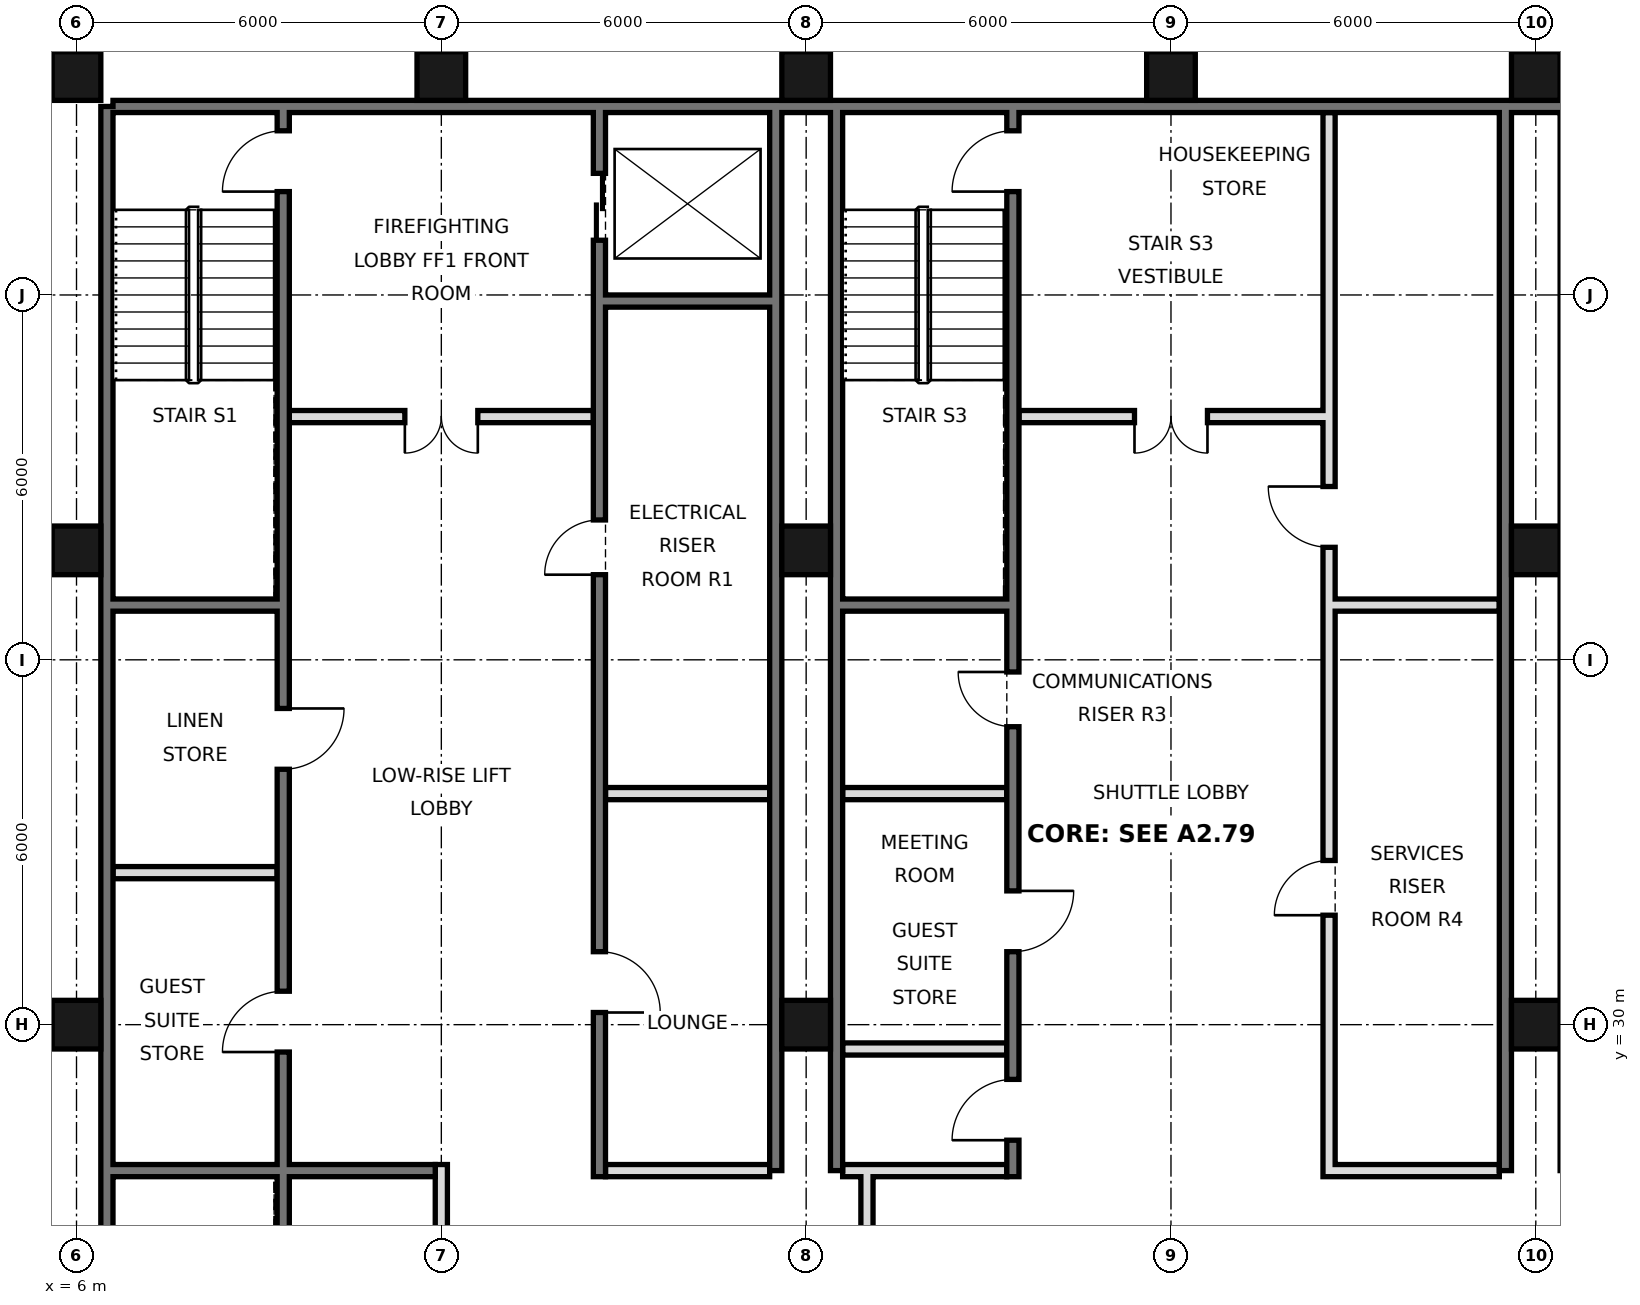
"""IFC4 building model, lengths in metres.
Left out: names, types, materials, properties, quantities, classifications, styles, units other than length and angle.
Written with IfcOpenShell. Run it as: python <this file> out.ifc"""

import sys

from ifc_helpers import new_model, si_unit, direction, frame, frame_2d, origin, origin_2d, place, context, subcontext, project, spatial, rectangle, hollow_rectangle, extrude, element, fill, save


model = new_model("IFC4")
c1 = context("Model", 3, precision=1e-05, world=origin(), true_north=direction((0.0, 1.0)))
c2 = subcontext(c1, "Body", "Model", "MODEL_VIEW")
j1 = project(units=[si_unit("LENGTHUNIT", "METRE"), si_unit("PLANEANGLEUNIT", "RADIAN")], contexts=[c1])
p1 = place(None, origin())
s1 = spatial("IfcSite", under=j1, at=p1, CompositionType="ELEMENT")
p2 = place(p1, origin())
s2 = spatial("IfcBuilding", under=s1, at=p2, CompositionType="ELEMENT")
p3 = place(p2, frame((0.0, 0.0, 316.0)))
s3 = spatial("IfcBuildingStorey", under=s2, at=p3, CompositionType="ELEMENT", Elevation=316.0)
for number, where, z_axis, x_axis in (
    (1, (6.0, 30.0, 0.0), (0.0, 0.0, 1.0), (1.0, 0.0, 0.0)),
    (2, (6.0, 37.8, 0.0), (0.0, 0.0, 1.0), (1.0, 0.0, 0.0)),
    (3, (6.0, 45.6, 0.0), (0.0, 0.0, 1.0), (1.0, 0.0, 0.0)),
    (4, (12.0, 45.6, 0.0), (0.0, 0.0, 1.0), (1.0, 0.0, 0.0)),
    (5, (18.0, 30.0, 0.0), (0.0, 0.0, 1.0), (1.0, 0.0, 0.0)),
    (6, (18.0, 37.8, 0.0), (0.0, 0.0, 1.0), (1.0, 0.0, 0.0)),
    (7, (18.0, 45.6, 0.0), (0.0, 0.0, 1.0), (1.0, 0.0, 0.0)),
    (8, (24.0, 45.6, 0.0), (0.0, 0.0, 1.0), (1.0, 0.0, 0.0)),
    (9, (30.0, 30.0, 0.0), (0.0, 0.0, 1.0), (1.0, 0.0, 0.0)),
    (10, (30.0, 37.8, 0.0), (0.0, 0.0, 1.0), (1.0, 0.0, 0.0)),
    (11, (30.0, 45.6, 0.0), (0.0, 0.0, 1.0), (1.0, 0.0, 0.0)),
):
    element("IfcColumn", number, at=place(p3, frame(where, z_axis=z_axis, x_axis=x_axis)), inside=s3, PredefinedType="COLUMN", context=c2, shape_type="SweptSolid", body=[
        extrude(hollow_rectangle(XDim=0.8, YDim=0.8, WallThickness=0.025, at=origin_2d()), origin(), (0.0, 0.0, 1.0), 3.6),
    ])
p4 = place(p3, frame((6.5, 21.6, 0.0), z_axis=(0.0, 0.0, 1.0), x_axis=(0.0, 1.0, 0.0)))
e12 = element("IfcWall", 12, at=p4, inside=s3, PredefinedType="SOLIDWALL", context=c2, shape_type="SweptSolid", body=[
    extrude(rectangle(XDim=23.5, YDim=0.2, at=frame_2d((11.75, 0.0))), origin(), (0.0, 0.0, 1.0), 3.42),
])
p5 = place(p3, frame((6.6, 45.1, 0.0), z_axis=(0.0, 0.0, 1.0), x_axis=(1.0, 0.0, 0.0)))
e13 = element("IfcWall", 13, at=p5, inside=s3, PredefinedType="SOLIDWALL", context=c2, shape_type="SweptSolid", body=[
    extrude(rectangle(XDim=34.8, YDim=0.2, at=frame_2d((17.4, 0.0))), origin(), (0.0, 0.0, 1.0), 3.42),
])
for number, where, z_axis, x_axis in (
    (14, (17.5, 27.6, 0.0), (0.0, 0.0, 1.0), (0.0, 1.0, 0.0)),
    (15, (18.5, 27.6, 0.0), (0.0, 0.0, 1.0), (0.0, 1.0, 0.0)),
    (16, (29.5, 27.6, 0.0), (0.0, 0.0, 1.0), (0.0, 1.0, 0.0)),
):
    element("IfcWall", number, at=place(p3, frame(where, z_axis=z_axis, x_axis=x_axis)), inside=s3, PredefinedType="SOLIDWALL", context=c2, shape_type="SweptSolid", body=[
        extrude(rectangle(XDim=17.5, YDim=0.2, at=frame_2d((8.75, 0.0))), origin(), (0.0, 0.0, 1.0), 3.42),
    ])
p6 = place(p3, frame((19.0, 21.6, 0.0), z_axis=(0.0, 0.0, 1.0), x_axis=(0.0, 1.0, 0.0)))
e17 = element("IfcWall", 17, at=p6, inside=s3, PredefinedType="PARTITIONING", context=c2, shape_type="SweptSolid", body=[
    extrude(rectangle(XDim=6.0, YDim=0.2, at=frame_2d((3.0, 0.0))), origin(), (0.0, 0.0, 1.0), 3.42),
])
p7 = place(p6, frame((2.1, 0.0, 0.0)))
e18 = element("IfcOpeningElement", 18, at=p7, cuts=e17, PredefinedType="OPENING", context=c2, shape_type="SweptSolid", body=[
    extrude(rectangle(XDim=1.8, YDim=2.1, at=frame_2d((0.9, 1.05))), frame((0.0, 0.11, 0.0), z_axis=(0.0, -1.0, 0.0), x_axis=(1.0, 0.0, 0.0)), (0.0, 0.0, 1.0), 0.22),
])
p8 = place(p3, frame((12.0, 21.6, 0.0), z_axis=(0.0, 0.0, 1.0), x_axis=(0.0, 1.0, 0.0)))
e19 = element("IfcWall", 19, at=p8, inside=s3, PredefinedType="PARTITIONING", context=c2, shape_type="SweptSolid", body=[
    extrude(rectangle(XDim=6.1, YDim=0.2, at=frame_2d((3.05, 0.0))), origin(), (0.0, 0.0, 1.0), 3.42),
])
p9 = place(p3, frame((14.6, 27.5, 0.0), z_axis=(0.0, 0.0, 1.0), x_axis=(0.0, 1.0, 0.0)))
e20 = element("IfcWall", 20, at=p9, inside=s3, PredefinedType="SOLIDWALL", context=c2, shape_type="SweptSolid", body=[
    extrude(rectangle(XDim=17.5, YDim=0.2, at=frame_2d((8.75, 0.0))), origin(), (0.0, 0.0, 1.0), 3.42),
])
p10 = place(p9, frame((15.4, 0.0, 0.0)))
e21 = element("IfcOpeningElement", 21, at=p10, cuts=e20, PredefinedType="OPENING", context=c2, shape_type="SweptSolid", body=[
    extrude(rectangle(XDim=1.1, YDim=2.1, at=frame_2d((0.55, 1.05))), frame((0.0, 0.11, 0.0), z_axis=(0.0, -1.0, 0.0), x_axis=(1.0, 0.0, 0.0)), (0.0, 0.0, 1.0), 0.22),
])
p11 = place(p9, frame((2.7, 0.0, 0.0)))
e22 = element("IfcOpeningElement", 22, at=p11, cuts=e20, PredefinedType="OPENING", context=c2, shape_type="SweptSolid", body=[
    extrude(rectangle(XDim=1.0, YDim=2.1, at=frame_2d((0.5, 1.05))), frame((0.0, 0.11, 0.0), z_axis=(0.0, -1.0, 0.0), x_axis=(1.0, 0.0, 0.0)), (0.0, 0.0, 1.0), 0.22),
])
p12 = place(p9, frame((9.9, 0.0, 0.0)))
e23 = element("IfcOpeningElement", 23, at=p12, cuts=e20, PredefinedType="OPENING", context=c2, shape_type="SweptSolid", body=[
    extrude(rectangle(XDim=0.9, YDim=2.1, at=frame_2d((0.45, 1.05))), frame((0.0, 0.11, 0.0), z_axis=(0.0, -1.0, 0.0), x_axis=(1.0, 0.0, 0.0)), (0.0, 0.0, 1.0), 0.22),
])
p13 = place(p3, frame((21.4, 27.5, 0.0), z_axis=(0.0, 0.0, 1.0), x_axis=(0.0, 1.0, 0.0)))
e24 = element("IfcWall", 24, at=p13, inside=s3, PredefinedType="SOLIDWALL", context=c2, shape_type="SweptSolid", body=[
    extrude(rectangle(XDim=17.5, YDim=0.2, at=frame_2d((8.75, 0.0))), origin(), (0.0, 0.0, 1.0), 3.42),
])
p14 = place(p13, frame((0.6, 0.0, 0.0)))
e25 = element("IfcOpeningElement", 25, at=p14, cuts=e24, PredefinedType="OPENING", context=c2, shape_type="SweptSolid", body=[
    extrude(rectangle(XDim=1.0, YDim=2.1, at=frame_2d((0.5, 1.05))), frame((0.0, 0.11, 0.0), z_axis=(0.0, -1.0, 0.0), x_axis=(1.0, 0.0, 0.0)), (0.0, 0.0, 1.0), 0.22),
])
p15 = place(p13, frame((3.7, 0.0, 0.0)))
e26 = element("IfcOpeningElement", 26, at=p15, cuts=e24, PredefinedType="OPENING", context=c2, shape_type="SweptSolid", body=[
    extrude(rectangle(XDim=1.0, YDim=2.1, at=frame_2d((0.5, 1.05))), frame((0.0, 0.11, 0.0), z_axis=(0.0, -1.0, 0.0), x_axis=(1.0, 0.0, 0.0)), (0.0, 0.0, 1.0), 0.22),
])
p16 = place(p13, frame((16.2, 0.0, 0.0)))
e27 = element("IfcOpeningElement", 27, at=p16, cuts=e24, PredefinedType="OPENING", context=c2, shape_type="SweptSolid", body=[
    extrude(rectangle(XDim=1.0, YDim=2.1, at=frame_2d((0.5, 1.05))), frame((0.0, 0.11, 0.0), z_axis=(0.0, -1.0, 0.0), x_axis=(1.0, 0.0, 0.0)), (0.0, 0.0, 1.0), 0.22),
])
p17 = place(p13, frame((7.4, 0.0, 0.0)))
e28 = element("IfcOpeningElement", 28, at=p17, cuts=e24, PredefinedType="OPENING", context=c2, shape_type="SweptSolid", body=[
    extrude(rectangle(XDim=0.9, YDim=2.1, at=frame_2d((0.45, 1.05))), frame((0.0, 0.11, 0.0), z_axis=(0.0, -1.0, 0.0), x_axis=(1.0, 0.0, 0.0)), (0.0, 0.0, 1.0), 0.22),
])
p18 = place(p3, frame((26.6, 27.5, 0.0), z_axis=(0.0, 0.0, 1.0), x_axis=(0.0, 1.0, 0.0)))
e29 = element("IfcWall", 29, at=p18, inside=s3, PredefinedType="SOLIDWALL", context=c2, shape_type="SweptSolid", body=[
    extrude(rectangle(XDim=17.5, YDim=0.2, at=frame_2d((8.75, 0.0))), origin(), (0.0, 0.0, 1.0), 3.42),
])
p19 = place(p18, frame((4.3, 0.0, 0.0)))
e30 = element("IfcOpeningElement", 30, at=p19, cuts=e29, PredefinedType="OPENING", context=c2, shape_type="SweptSolid", body=[
    extrude(rectangle(XDim=0.9, YDim=2.1, at=frame_2d((0.45, 1.05))), frame((0.0, 0.11, 0.0), z_axis=(0.0, -1.0, 0.0), x_axis=(1.0, 0.0, 0.0)), (0.0, 0.0, 1.0), 0.22),
])
p20 = place(p18, frame((10.35, 0.0, 0.0)))
e31 = element("IfcOpeningElement", 31, at=p20, cuts=e29, PredefinedType="OPENING", context=c2, shape_type="SweptSolid", body=[
    extrude(rectangle(XDim=1.0, YDim=2.1, at=frame_2d((0.5, 1.05))), frame((0.0, 0.11, 0.0), z_axis=(0.0, -1.0, 0.0), x_axis=(1.0, 0.0, 0.0)), (0.0, 0.0, 1.0), 0.22),
])
p21 = place(p3, frame((9.4, 21.6, 0.0), z_axis=(0.0, 0.0, 1.0), x_axis=(0.0, 1.0, 0.0)))
e32 = element("IfcWall", 32, at=p21, inside=s3, PredefinedType="SOLIDWALL", context=c2, shape_type="SweptSolid", body=[
    extrude(rectangle(XDim=23.4, YDim=0.2, at=frame_2d((11.7, 0.0))), origin(), (0.0, 0.0, 1.0), 3.42),
])
p22 = place(p21, frame((7.95, 0.0, 0.0)))
e33 = element("IfcOpeningElement", 33, at=p22, cuts=e32, PredefinedType="OPENING", context=c2, shape_type="SweptSolid", body=[
    extrude(rectangle(XDim=1.0, YDim=2.1, at=frame_2d((0.5, 1.05))), frame((0.0, 0.11, 0.0), z_axis=(0.0, -1.0, 0.0), x_axis=(1.0, 0.0, 0.0)), (0.0, 0.0, 1.0), 0.22),
])
p23 = place(p21, frame((12.6, 0.0, 0.0)))
e34 = element("IfcOpeningElement", 34, at=p23, cuts=e32, PredefinedType="OPENING", context=c2, shape_type="SweptSolid", body=[
    extrude(rectangle(XDim=1.0, YDim=2.1, at=frame_2d((0.5, 1.05))), frame((0.0, 0.11, 0.0), z_axis=(0.0, -1.0, 0.0), x_axis=(1.0, 0.0, 0.0)), (0.0, 0.0, 1.0), 0.22),
])
p24 = place(p21, frame((22.1, 0.0, 0.0)))
e35 = element("IfcOpeningElement", 35, at=p24, cuts=e32, PredefinedType="OPENING", context=c2, shape_type="SweptSolid", body=[
    extrude(rectangle(XDim=1.0, YDim=2.1, at=frame_2d((0.5, 1.05))), frame((0.0, 0.11, 0.0), z_axis=(0.0, -1.0, 0.0), x_axis=(1.0, 0.0, 0.0)), (0.0, 0.0, 1.0), 0.22),
])
p25 = place(p21, frame((0.175, 0.0, 0.0)))
e36 = element("IfcOpeningElement", 36, at=p25, cuts=e32, PredefinedType="OPENING", context=c2, shape_type="SweptSolid", body=[
    extrude(rectangle(XDim=0.9, YDim=2.1, at=frame_2d((0.45, 1.05))), frame((0.0, 0.11, 0.0), z_axis=(0.0, -1.0, 0.0), x_axis=(1.0, 0.0, 0.0)), (0.0, 0.0, 1.0), 0.22),
])
for number, where, z_axis, x_axis in (
    (37, (14.7, 27.6, 0.0), (0.0, 0.0, 1.0), (1.0, 0.0, 0.0)),
    (38, (18.6, 27.6, 0.0), (0.0, 0.0, 1.0), (1.0, 0.0, 0.0)),
):
    element("IfcWall", number, at=place(p3, frame(where, z_axis=z_axis, x_axis=x_axis)), inside=s3, PredefinedType="PARTITIONING", context=c2, shape_type="SweptSolid", body=[
        extrude(rectangle(XDim=2.7, YDim=0.2, at=frame_2d((1.35, 0.0))), origin(), (0.0, 0.0, 1.0), 3.42),
    ])
p26 = place(p3, frame((26.7, 27.6, 0.0), z_axis=(0.0, 0.0, 1.0), x_axis=(1.0, 0.0, 0.0)))
e39 = element("IfcWall", 39, at=p26, inside=s3, PredefinedType="SOLIDWALL", context=c2, shape_type="SweptSolid", body=[
    extrude(rectangle(XDim=2.7, YDim=0.2, at=frame_2d((1.35, 0.0))), origin(), (0.0, 0.0, 1.0), 3.42),
])
p27 = place(p3, frame((6.6, 27.6, 0.0), z_axis=(0.0, 0.0, 1.0), x_axis=(1.0, 0.0, 0.0)))
e40 = element("IfcWall", 40, at=p27, inside=s3, PredefinedType="SOLIDWALL", context=c2, shape_type="SweptSolid", body=[
    extrude(rectangle(XDim=5.3, YDim=0.2, at=frame_2d((2.65, 0.0))), origin(), (0.0, 0.0, 1.0), 3.42),
])
for number, where, z_axis, x_axis in (
    (41, (18.6, 29.6, 0.0), (0.0, 0.0, 1.0), (1.0, 0.0, 0.0)),
    (42, (6.6, 32.5, 0.0), (0.0, 0.0, 1.0), (1.0, 0.0, 0.0)),
):
    element("IfcWall", number, at=place(p3, frame(where, z_axis=z_axis, x_axis=x_axis)), inside=s3, PredefinedType="PARTITIONING", context=c2, shape_type="SweptSolid", body=[
        extrude(rectangle(XDim=2.7, YDim=0.2, at=frame_2d((1.35, 0.0))), origin(), (0.0, 0.0, 1.0), 3.42),
    ])
for number, where, z_axis, x_axis in (
    (43, (14.7, 33.8, 0.0), (0.0, 0.0, 1.0), (1.0, 0.0, 0.0)),
    (44, (18.6, 33.8, 0.0), (0.0, 0.0, 1.0), (1.0, 0.0, 0.0)),
    (45, (18.6, 36.9, 0.0), (0.0, 0.0, 1.0), (1.0, 0.0, 0.0)),
    (46, (26.7, 36.9, 0.0), (0.0, 0.0, 1.0), (1.0, 0.0, 0.0)),
    (47, (6.6, 36.9, 0.0), (0.0, 0.0, 1.0), (1.0, 0.0, 0.0)),
):
    element("IfcWall", number, at=place(p3, frame(where, z_axis=z_axis, x_axis=x_axis)), inside=s3, PredefinedType="SOLIDWALL", context=c2, shape_type="SweptSolid", body=[
        extrude(rectangle(XDim=2.7, YDim=0.2, at=frame_2d((1.35, 0.0))), origin(), (0.0, 0.0, 1.0), 3.42),
    ])
p28 = place(p3, frame((21.5, 40.0, 0.0), z_axis=(0.0, 0.0, 1.0), x_axis=(1.0, 0.0, 0.0)))
e48 = element("IfcWall", 48, at=p28, inside=s3, PredefinedType="PARTITIONING", context=c2, shape_type="SweptSolid", body=[
    extrude(rectangle(XDim=5.0, YDim=0.2, at=frame_2d((2.5, 0.0))), origin(), (0.0, 0.0, 1.0), 3.42),
])
p29 = place(p28, frame((1.9, 0.0, 0.0)))
e49 = element("IfcOpeningElement", 49, at=p29, cuts=e48, PredefinedType="OPENING", context=c2, shape_type="SweptSolid", body=[
    extrude(rectangle(XDim=1.2, YDim=2.1, at=frame_2d((0.6, 1.05))), frame((0.0, 0.11, 0.0), z_axis=(0.0, -1.0, 0.0), x_axis=(1.0, 0.0, 0.0)), (0.0, 0.0, 1.0), 0.22),
])
p30 = place(p3, frame((9.5, 40.0, 0.0), z_axis=(0.0, 0.0, 1.0), x_axis=(1.0, 0.0, 0.0)))
e50 = element("IfcWall", 50, at=p30, inside=s3, PredefinedType="PARTITIONING", context=c2, shape_type="SweptSolid", body=[
    extrude(rectangle(XDim=5.0, YDim=0.2, at=frame_2d((2.5, 0.0))), origin(), (0.0, 0.0, 1.0), 3.42),
])
p31 = place(p30, frame((1.9, 0.0, 0.0)))
e51 = element("IfcOpeningElement", 51, at=p31, cuts=e50, PredefinedType="OPENING", context=c2, shape_type="SweptSolid", body=[
    extrude(rectangle(XDim=1.2, YDim=2.1, at=frame_2d((0.6, 1.05))), frame((0.0, 0.11, 0.0), z_axis=(0.0, -1.0, 0.0), x_axis=(1.0, 0.0, 0.0)), (0.0, 0.0, 1.0), 0.22),
])
p32 = place(p3, frame((14.7, 41.9, 0.0), z_axis=(0.0, 0.0, 1.0), x_axis=(1.0, 0.0, 0.0)))
e52 = element("IfcWall", 52, at=p32, inside=s3, PredefinedType="SOLIDWALL", context=c2, shape_type="SweptSolid", body=[
    extrude(rectangle(XDim=2.7, YDim=0.2, at=frame_2d((1.35, 0.0))), origin(), (0.0, 0.0, 1.0), 3.42),
])
p33 = place(p31, frame((1.2, 0.0, 0.0), z_axis=(0.0, 0.0, 1.0), x_axis=(-1.0, 0.0, 0.0)))
e53 = element("IfcDoor", 53, at=p33, inside=s3, OperationType="DOUBLE_DOOR_SINGLE_SWING", PredefinedType="DOOR", context=c2, shape_type="SweptSolid", body=[
    extrude(rectangle(XDim=1.2, YDim=2.1, at=frame_2d((0.6, 1.05))), frame((0.0, 0.025, 0.0), z_axis=(0.0, -1.0, 0.0), x_axis=(1.0, 0.0, 0.0)), (0.0, 0.0, 1.0), 0.05),
])
fill(e51, e53)
p34 = place(p29, frame((1.2, 0.0, 0.0), z_axis=(0.0, 0.0, 1.0), x_axis=(-1.0, 0.0, 0.0)))
e54 = element("IfcDoor", 54, at=p34, inside=s3, OperationType="DOUBLE_DOOR_SINGLE_SWING", PredefinedType="DOOR", context=c2, shape_type="SweptSolid", body=[
    extrude(rectangle(XDim=1.2, YDim=2.1, at=frame_2d((0.6, 1.05))), frame((0.0, 0.025, 0.0), z_axis=(0.0, -1.0, 0.0), x_axis=(1.0, 0.0, 0.0)), (0.0, 0.0, 1.0), 0.05),
])
fill(e49, e54)
p35 = place(p10, origin())
e55 = element("IfcDoor", 55, at=p35, inside=s3, OperationType="DOUBLE_DOOR_SLIDING", PredefinedType="DOOR", context=c2, shape_type="SweptSolid", body=[
    extrude(rectangle(XDim=1.1, YDim=2.1, at=frame_2d((0.55, 1.05))), frame((0.0, 0.025, 0.0), z_axis=(0.0, -1.0, 0.0), x_axis=(1.0, 0.0, 0.0)), (0.0, 0.0, 1.0), 0.05),
])
fill(e21, e55)
p36 = place(p14, origin())
e56 = element("IfcDoor", 56, at=p36, inside=s3, OperationType="SINGLE_SWING_LEFT", PredefinedType="DOOR", context=c2, shape_type="SweptSolid", body=[
    extrude(rectangle(XDim=1.0, YDim=2.1, at=frame_2d((0.5, 1.05))), frame((0.0, 0.025, 0.0), z_axis=(0.0, -1.0, 0.0), x_axis=(1.0, 0.0, 0.0)), (0.0, 0.0, 1.0), 0.05),
])
fill(e25, e56)
p37 = place(p15, origin())
e57 = element("IfcDoor", 57, at=p37, inside=s3, OperationType="SINGLE_SWING_RIGHT", PredefinedType="DOOR", context=c2, shape_type="SweptSolid", body=[
    extrude(rectangle(XDim=1.0, YDim=2.1, at=frame_2d((0.5, 1.05))), frame((0.0, 0.025, 0.0), z_axis=(0.0, -1.0, 0.0), x_axis=(1.0, 0.0, 0.0)), (0.0, 0.0, 1.0), 0.05),
])
fill(e26, e57)
p38 = place(p11, frame((1.0, 0.0, 0.0), z_axis=(0.0, 0.0, 1.0), x_axis=(-1.0, 0.0, 0.0)))
e58 = element("IfcDoor", 58, at=p38, inside=s3, OperationType="SINGLE_SWING_RIGHT", PredefinedType="DOOR", context=c2, shape_type="SweptSolid", body=[
    extrude(rectangle(XDim=1.0, YDim=2.1, at=frame_2d((0.5, 1.05))), frame((0.0, 0.025, 0.0), z_axis=(0.0, -1.0, 0.0), x_axis=(1.0, 0.0, 0.0)), (0.0, 0.0, 1.0), 0.05),
])
fill(e22, e58)
p39 = place(p22, origin())
e59 = element("IfcDoor", 59, at=p39, inside=s3, OperationType="SINGLE_SWING_LEFT", PredefinedType="DOOR", context=c2, shape_type="SweptSolid", body=[
    extrude(rectangle(XDim=1.0, YDim=2.1, at=frame_2d((0.5, 1.05))), frame((0.0, 0.025, 0.0), z_axis=(0.0, -1.0, 0.0), x_axis=(1.0, 0.0, 0.0)), (0.0, 0.0, 1.0), 0.05),
])
fill(e33, e59)
p40 = place(p23, origin())
e60 = element("IfcDoor", 60, at=p40, inside=s3, OperationType="SINGLE_SWING_RIGHT", PredefinedType="DOOR", context=c2, shape_type="SweptSolid", body=[
    extrude(rectangle(XDim=1.0, YDim=2.1, at=frame_2d((0.5, 1.05))), frame((0.0, 0.025, 0.0), z_axis=(0.0, -1.0, 0.0), x_axis=(1.0, 0.0, 0.0)), (0.0, 0.0, 1.0), 0.05),
])
fill(e34, e60)
p41 = place(p24, origin())
e61 = element("IfcDoor", 61, at=p41, inside=s3, OperationType="SINGLE_SWING_LEFT", PredefinedType="DOOR", context=c2, shape_type="SweptSolid", body=[
    extrude(rectangle(XDim=1.0, YDim=2.1, at=frame_2d((0.5, 1.05))), frame((0.0, 0.025, 0.0), z_axis=(0.0, -1.0, 0.0), x_axis=(1.0, 0.0, 0.0)), (0.0, 0.0, 1.0), 0.05),
])
fill(e35, e61)
p42 = place(p16, origin())
e62 = element("IfcDoor", 62, at=p42, inside=s3, OperationType="SINGLE_SWING_LEFT", PredefinedType="DOOR", context=c2, shape_type="SweptSolid", body=[
    extrude(rectangle(XDim=1.0, YDim=2.1, at=frame_2d((0.5, 1.05))), frame((0.0, 0.025, 0.0), z_axis=(0.0, -1.0, 0.0), x_axis=(1.0, 0.0, 0.0)), (0.0, 0.0, 1.0), 0.05),
])
fill(e27, e62)
p43 = place(p12, origin())
e63 = element("IfcDoor", 63, at=p43, inside=s3, OperationType="SINGLE_SWING_LEFT", PredefinedType="DOOR", context=c2, shape_type="SweptSolid", body=[
    extrude(rectangle(XDim=0.9, YDim=2.1, at=frame_2d((0.45, 1.05))), frame((0.0, 0.025, 0.0), z_axis=(0.0, -1.0, 0.0), x_axis=(1.0, 0.0, 0.0)), (0.0, 0.0, 1.0), 0.05),
])
fill(e23, e63)
p44 = place(p17, frame((0.9, 0.0, 0.0), z_axis=(0.0, 0.0, 1.0), x_axis=(-1.0, 0.0, 0.0)))
e64 = element("IfcDoor", 64, at=p44, inside=s3, OperationType="SINGLE_SWING_LEFT", PredefinedType="DOOR", context=c2, shape_type="SweptSolid", body=[
    extrude(rectangle(XDim=0.9, YDim=2.1, at=frame_2d((0.45, 1.05))), frame((0.0, 0.025, 0.0), z_axis=(0.0, -1.0, 0.0), x_axis=(1.0, 0.0, 0.0)), (0.0, 0.0, 1.0), 0.05),
])
fill(e28, e64)
p45 = place(p19, origin())
e65 = element("IfcDoor", 65, at=p45, inside=s3, OperationType="SINGLE_SWING_LEFT", PredefinedType="DOOR", context=c2, shape_type="SweptSolid", body=[
    extrude(rectangle(XDim=0.9, YDim=2.1, at=frame_2d((0.45, 1.05))), frame((0.0, 0.025, 0.0), z_axis=(0.0, -1.0, 0.0), x_axis=(1.0, 0.0, 0.0)), (0.0, 0.0, 1.0), 0.05),
])
fill(e30, e65)
p46 = place(p20, frame((1.0, 0.0, 0.0), z_axis=(0.0, 0.0, 1.0), x_axis=(-1.0, 0.0, 0.0)))
e66 = element("IfcDoor", 66, at=p46, inside=s3, OperationType="SINGLE_SWING_LEFT", PredefinedType="DOOR", context=c2, shape_type="SweptSolid", body=[
    extrude(rectangle(XDim=1.0, YDim=2.1, at=frame_2d((0.5, 1.05))), frame((0.0, 0.025, 0.0), z_axis=(0.0, -1.0, 0.0), x_axis=(1.0, 0.0, 0.0)), (0.0, 0.0, 1.0), 0.05),
])
fill(e31, e66)
save(model, sys.argv[1])
